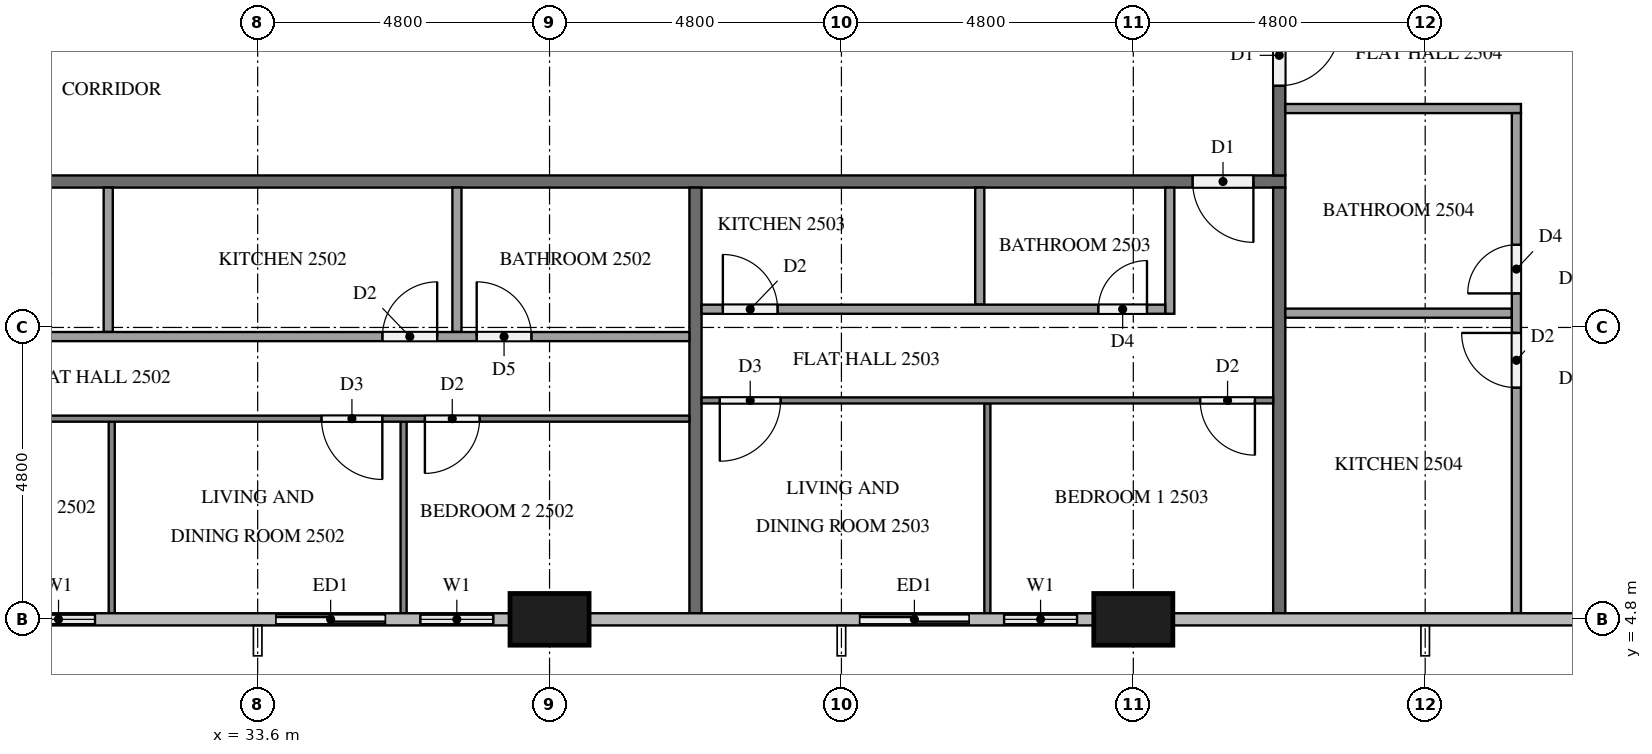
"""IFC4 building model, lengths in metres.
Left out: names, types, materials, properties, quantities, classifications, styles, units other than length and angle.
Written with IfcOpenShell. Run it as: python <this file> out.ifc"""

import sys

from ifc_helpers import new_model, si_unit, direction, frame, frame_2d, origin, origin_2d, place, context, subcontext, project, spatial, rectangle, extrude, element, fill, save


model = new_model("IFC4")
c1 = context("Model", 3, precision=1e-05, world=origin(), true_north=direction((0.0, 1.0)))
c2 = subcontext(c1, "Body", "Model", "MODEL_VIEW")
j1 = project(units=[si_unit("LENGTHUNIT", "METRE"), si_unit("PLANEANGLEUNIT", "RADIAN")], contexts=[c1])
p1 = place(None, origin())
s1 = spatial("IfcSite", under=j1, at=p1, CompositionType="ELEMENT")
p2 = place(p1, origin())
s2 = spatial("IfcBuilding", under=s1, at=p2, CompositionType="ELEMENT")
p3 = place(p2, frame((0.0, 0.0, 99.7)))
s3 = spatial("IfcBuildingStorey", under=s2, at=p3, CompositionType="ELEMENT", Elevation=99.7)
for number, where, z_axis, x_axis in (
    (1, (38.4, 4.8, 0.0), (0.0, 0.0, 1.0), (1.0, 0.0, 0.0)),
    (2, (48.0, 4.8, 0.0), (0.0, 0.0, 1.0), (1.0, 0.0, 0.0)),
):
    element("IfcColumn", number, at=place(p3, frame(where, z_axis=z_axis, x_axis=x_axis)), inside=s3, PredefinedType="COLUMN", context=c2, shape_type="SweptSolid", body=[
        extrude(rectangle(XDim=1.3, YDim=0.85, at=origin_2d()), origin(), (0.0, 0.0, 1.0), 3.2),
    ])
p4 = place(p3, frame((29.45, 4.8, 0.0), z_axis=(0.0, 0.0, 1.0), x_axis=(1.0, 0.0, 0.0)))
e3 = element("IfcWall", 3, at=p4, inside=s3, PredefinedType="SOLIDWALL", context=c2, shape_type="SweptSolid", body=[
    extrude(rectangle(XDim=1.75, YDim=0.15, at=frame_2d((0.875, 0.0))), origin(), (0.0, 0.0, 1.0), 3.2),
])
p5 = place(p4, frame((0.275, 0.0, 0.9)))
e4 = element("IfcOpeningElement", 4, at=p5, cuts=e3, PredefinedType="OPENING", context=c2, shape_type="SweptSolid", body=[
    extrude(rectangle(XDim=1.2, YDim=1.4, at=frame_2d((0.6, 0.7))), frame((0.0, 0.085, 0.0), z_axis=(0.0, -1.0, 0.0), x_axis=(1.0, 0.0, 0.0)), (0.0, 0.0, 1.0), 0.17),
])
p6 = place(p3, frame((33.6, 4.8, 0.0), z_axis=(0.0, 0.0, 1.0), x_axis=(1.0, 0.0, 0.0)))
e5 = element("IfcWall", 5, at=p6, inside=s3, PredefinedType="SOLIDWALL", context=c2, shape_type="SweptSolid", body=[
    extrude(rectangle(XDim=4.15, YDim=0.15, at=frame_2d((2.075, 0.0))), origin(), (0.0, 0.0, 1.0), 3.2),
])
p7 = place(p6, frame((0.3, 0.0, 0.0)))
e6 = element("IfcOpeningElement", 6, at=p7, cuts=e5, PredefinedType="OPENING", context=c2, shape_type="SweptSolid", body=[
    extrude(rectangle(XDim=1.8, YDim=2.4, at=frame_2d((0.9, 1.2))), frame((0.0, 0.085, 0.0), z_axis=(0.0, -1.0, 0.0), x_axis=(1.0, 0.0, 0.0)), (0.0, 0.0, 1.0), 0.17),
])
p8 = place(p6, frame((2.675, 0.0, 0.9)))
e7 = element("IfcOpeningElement", 7, at=p8, cuts=e5, PredefinedType="OPENING", context=c2, shape_type="SweptSolid", body=[
    extrude(rectangle(XDim=1.2, YDim=1.4, at=frame_2d((0.6, 0.7))), frame((0.0, 0.085, 0.0), z_axis=(0.0, -1.0, 0.0), x_axis=(1.0, 0.0, 0.0)), (0.0, 0.0, 1.0), 0.17),
])
p9 = place(p3, frame((43.2, 4.8, 0.0), z_axis=(0.0, 0.0, 1.0), x_axis=(1.0, 0.0, 0.0)))
e8 = element("IfcWall", 8, at=p9, inside=s3, PredefinedType="SOLIDWALL", context=c2, shape_type="SweptSolid", body=[
    extrude(rectangle(XDim=4.15, YDim=0.15, at=frame_2d((2.075, 0.0))), origin(), (0.0, 0.0, 1.0), 3.2),
])
p10 = place(p9, frame((0.3, 0.0, 0.0)))
e9 = element("IfcOpeningElement", 9, at=p10, cuts=e8, PredefinedType="OPENING", context=c2, shape_type="SweptSolid", body=[
    extrude(rectangle(XDim=1.8, YDim=2.4, at=frame_2d((0.9, 1.2))), frame((0.0, 0.085, 0.0), z_axis=(0.0, -1.0, 0.0), x_axis=(1.0, 0.0, 0.0)), (0.0, 0.0, 1.0), 0.17),
])
p11 = place(p9, frame((2.675, 0.0, 0.9)))
e10 = element("IfcOpeningElement", 10, at=p11, cuts=e8, PredefinedType="OPENING", context=c2, shape_type="SweptSolid", body=[
    extrude(rectangle(XDim=1.2, YDim=1.4, at=frame_2d((0.6, 0.7))), frame((0.0, 0.085, 0.0), z_axis=(0.0, -1.0, 0.0), x_axis=(1.0, 0.0, 0.0)), (0.0, 0.0, 1.0), 0.17),
])
p12 = place(p3, frame((50.5, 12.0, 0.0), z_axis=(0.0, 0.0, 1.0), x_axis=(-1.0, 0.0, 0.0)))
e11 = element("IfcWall", 11, at=p12, inside=s3, PredefinedType="PARTITIONING", context=c2, shape_type="SweptSolid", body=[
    extrude(rectangle(XDim=38.6, YDim=0.2, at=frame_2d((19.3, 0.0))), origin(), (0.0, 0.0, 1.0), 3.2),
])
p13 = place(p12, frame((37.075, 0.0, 0.0)))
e12 = element("IfcOpeningElement", 12, at=p13, cuts=e11, PredefinedType="OPENING", context=c2, shape_type="SweptSolid", body=[
    extrude(rectangle(XDim=1.0, YDim=2.1, at=frame_2d((0.5, 1.05))), frame((0.0, 0.11, 0.0), z_axis=(0.0, -1.0, 0.0), x_axis=(1.0, 0.0, 0.0)), (0.0, 0.0, 1.0), 0.22),
])
p14 = place(p12, frame((22.675, 0.0, 0.0)))
e13 = element("IfcOpeningElement", 13, at=p14, cuts=e11, PredefinedType="OPENING", context=c2, shape_type="SweptSolid", body=[
    extrude(rectangle(XDim=1.0, YDim=2.1, at=frame_2d((0.5, 1.05))), frame((0.0, 0.11, 0.0), z_axis=(0.0, -1.0, 0.0), x_axis=(1.0, 0.0, 0.0)), (0.0, 0.0, 1.0), 0.22),
])
p15 = place(p12, frame((0.525, 0.0, 0.0)))
e14 = element("IfcOpeningElement", 14, at=p15, cuts=e11, PredefinedType="OPENING", context=c2, shape_type="SweptSolid", body=[
    extrude(rectangle(XDim=1.0, YDim=2.1, at=frame_2d((0.5, 1.05))), frame((0.0, 0.11, 0.0), z_axis=(0.0, -1.0, 0.0), x_axis=(1.0, 0.0, 0.0)), (0.0, 0.0, 1.0), 0.22),
])
p16 = place(p3, frame((50.4, 14.9, 0.0), z_axis=(0.0, 0.0, 1.0), x_axis=(0.0, -1.0, 0.0)))
e15 = element("IfcWall", 15, at=p16, inside=s3, PredefinedType="PARTITIONING", context=c2, shape_type="SweptSolid", body=[
    extrude(rectangle(XDim=2.8, YDim=0.2, at=frame_2d((1.4, 0.0))), origin(), (0.0, 0.0, 1.0), 3.2),
])
p17 = place(p16, frame((0.325, 0.0, 0.0)))
e16 = element("IfcOpeningElement", 16, at=p17, cuts=e15, PredefinedType="OPENING", context=c2, shape_type="SweptSolid", body=[
    extrude(rectangle(XDim=1.0, YDim=2.1, at=frame_2d((0.5, 1.05))), frame((0.0, 0.11, 0.0), z_axis=(0.0, -1.0, 0.0), x_axis=(1.0, 0.0, 0.0)), (0.0, 0.0, 1.0), 0.22),
])
for number, where, z_axis, x_axis in (
    (17, (40.8, 11.9, 0.0), (0.0, 0.0, 1.0), (0.0, -1.0, 0.0)),
    (18, (50.4, 11.9, 0.0), (0.0, 0.0, 1.0), (0.0, -1.0, 0.0)),
):
    element("IfcWall", number, at=place(p3, frame(where, z_axis=z_axis, x_axis=x_axis)), inside=s3, PredefinedType="PARTITIONING", context=c2, shape_type="SweptSolid", body=[
        extrude(rectangle(XDim=7.0, YDim=0.2, at=frame_2d((3.5, 0.0))), origin(), (0.0, 0.0, 1.0), 3.2),
    ])
for number, where, z_axis, x_axis in (
    (19, (31.2, 8.05, 0.0), (0.0, 0.0, 1.0), (0.0, -1.0, 0.0)),
    (20, (36.0, 8.05, 0.0), (0.0, 0.0, 1.0), (0.0, -1.0, 0.0)),
):
    element("IfcWall", number, at=place(p3, frame(where, z_axis=z_axis, x_axis=x_axis)), inside=s3, PredefinedType="PARTITIONING", context=c2, shape_type="SweptSolid", body=[
        extrude(rectangle(XDim=3.15, YDim=0.1, at=frame_2d((1.575, 0.0))), origin(), (0.0, 0.0, 1.0), 3.2),
    ])
p18 = place(p3, frame((40.7, 8.1, 0.0), z_axis=(0.0, 0.0, 1.0), x_axis=(-1.0, 0.0, 0.0)))
e21 = element("IfcWall", 21, at=p18, inside=s3, PredefinedType="PARTITIONING", context=c2, shape_type="SweptSolid", body=[
    extrude(rectangle(XDim=14.2, YDim=0.1, at=frame_2d((7.1, 0.0))), origin(), (0.0, 0.0, 1.0), 3.2),
])
p19 = place(p18, frame((13.0, 0.0, 0.0)))
e22 = element("IfcOpeningElement", 22, at=p19, cuts=e21, PredefinedType="OPENING", context=c2, shape_type="SweptSolid", body=[
    extrude(rectangle(XDim=0.9, YDim=2.1, at=frame_2d((0.45, 1.05))), frame((0.0, 0.06, 0.0), z_axis=(0.0, -1.0, 0.0), x_axis=(1.0, 0.0, 0.0)), (0.0, 0.0, 1.0), 0.12),
])
p20 = place(p18, frame((5.05, 0.0, 0.0)))
e23 = element("IfcOpeningElement", 23, at=p20, cuts=e21, PredefinedType="OPENING", context=c2, shape_type="SweptSolid", body=[
    extrude(rectangle(XDim=1.0, YDim=2.1, at=frame_2d((0.5, 1.05))), frame((0.0, 0.06, 0.0), z_axis=(0.0, -1.0, 0.0), x_axis=(1.0, 0.0, 0.0)), (0.0, 0.0, 1.0), 0.12),
])
p21 = place(p18, frame((3.45, 0.0, 0.0)))
e24 = element("IfcOpeningElement", 24, at=p21, cuts=e21, PredefinedType="OPENING", context=c2, shape_type="SweptSolid", body=[
    extrude(rectangle(XDim=0.9, YDim=2.1, at=frame_2d((0.45, 1.05))), frame((0.0, 0.06, 0.0), z_axis=(0.0, -1.0, 0.0), x_axis=(1.0, 0.0, 0.0)), (0.0, 0.0, 1.0), 0.12),
])
for number, where, z_axis, x_axis in (
    (25, (31.142, 11.9, 0.0), (0.0, 0.0, 1.0), (0.0, -1.0, 0.0)),
    (26, (36.877, 11.9, 0.0), (0.0, 0.0, 1.0), (0.0, -1.0, 0.0)),
):
    element("IfcWall", number, at=place(p3, frame(where, z_axis=z_axis, x_axis=x_axis)), inside=s3, PredefinedType="PARTITIONING", context=c2, shape_type="SweptSolid", body=[
        extrude(rectangle(XDim=2.375, YDim=0.15, at=frame_2d((1.188, 0.0))), origin(), (0.0, 0.0, 1.0), 3.2),
    ])
p22 = place(p3, frame((28.275, 9.45, 0.0), z_axis=(0.0, 0.0, 1.0), x_axis=(1.0, 0.0, 0.0)))
e27 = element("IfcWall", 27, at=p22, inside=s3, PredefinedType="PARTITIONING", context=c2, shape_type="SweptSolid", body=[
    extrude(rectangle(XDim=12.425, YDim=0.15, at=frame_2d((6.212, 0.0))), origin(), (0.0, 0.0, 1.0), 3.2),
])
p23 = place(p22, frame((0.3, 0.0, 0.0)))
e28 = element("IfcOpeningElement", 28, at=p23, cuts=e27, PredefinedType="OPENING", context=c2, shape_type="SweptSolid", body=[
    extrude(rectangle(XDim=0.8, YDim=2.1, at=frame_2d((0.4, 1.05))), frame((0.0, 0.085, 0.0), z_axis=(0.0, -1.0, 0.0), x_axis=(1.0, 0.0, 0.0)), (0.0, 0.0, 1.0), 0.17),
])
p24 = place(p22, frame((7.377, 0.0, 0.0)))
e29 = element("IfcOpeningElement", 29, at=p24, cuts=e27, PredefinedType="OPENING", context=c2, shape_type="SweptSolid", body=[
    extrude(rectangle(XDim=0.9, YDim=2.1, at=frame_2d((0.45, 1.05))), frame((0.0, 0.085, 0.0), z_axis=(0.0, -1.0, 0.0), x_axis=(1.0, 0.0, 0.0)), (0.0, 0.0, 1.0), 0.17),
])
p25 = place(p22, frame((8.927, 0.0, 0.0)))
e30 = element("IfcOpeningElement", 30, at=p25, cuts=e27, PredefinedType="OPENING", context=c2, shape_type="SweptSolid", body=[
    extrude(rectangle(XDim=0.9, YDim=2.1, at=frame_2d((0.45, 1.05))), frame((0.0, 0.085, 0.0), z_axis=(0.0, -1.0, 0.0), x_axis=(1.0, 0.0, 0.0)), (0.0, 0.0, 1.0), 0.17),
])
p26 = place(p3, frame((45.6, 8.35, 0.0), z_axis=(0.0, 0.0, 1.0), x_axis=(0.0, -1.0, 0.0)))
e31 = element("IfcWall", 31, at=p26, inside=s3, PredefinedType="PARTITIONING", context=c2, shape_type="SweptSolid", body=[
    extrude(rectangle(XDim=3.45, YDim=0.1, at=frame_2d((1.725, 0.0))), origin(), (0.0, 0.0, 1.0), 3.2),
])
p27 = place(p3, frame((50.3, 8.4, 0.0), z_axis=(0.0, 0.0, 1.0), x_axis=(-1.0, 0.0, 0.0)))
e32 = element("IfcWall", 32, at=p27, inside=s3, PredefinedType="PARTITIONING", context=c2, shape_type="SweptSolid", body=[
    extrude(rectangle(XDim=9.4, YDim=0.1, at=frame_2d((4.7, 0.0))), origin(), (0.0, 0.0, 1.0), 3.2),
])
p28 = place(p27, frame((0.3, 0.0, 0.0)))
e33 = element("IfcOpeningElement", 33, at=p28, cuts=e32, PredefinedType="OPENING", context=c2, shape_type="SweptSolid", body=[
    extrude(rectangle(XDim=0.9, YDim=2.1, at=frame_2d((0.45, 1.05))), frame((0.0, 0.06, 0.0), z_axis=(0.0, -1.0, 0.0), x_axis=(1.0, 0.0, 0.0)), (0.0, 0.0, 1.0), 0.12),
])
p29 = place(p27, frame((8.1, 0.0, 0.0)))
e34 = element("IfcOpeningElement", 34, at=p29, cuts=e32, PredefinedType="OPENING", context=c2, shape_type="SweptSolid", body=[
    extrude(rectangle(XDim=1.0, YDim=2.1, at=frame_2d((0.5, 1.05))), frame((0.0, 0.06, 0.0), z_axis=(0.0, -1.0, 0.0), x_axis=(1.0, 0.0, 0.0)), (0.0, 0.0, 1.0), 0.12),
])
p30 = place(p3, frame((45.475, 11.9, 0.0), z_axis=(0.0, 0.0, 1.0), x_axis=(0.0, -1.0, 0.0)))
e35 = element("IfcWall", 35, at=p30, inside=s3, PredefinedType="PARTITIONING", context=c2, shape_type="SweptSolid", body=[
    extrude(rectangle(XDim=1.925, YDim=0.15, at=frame_2d((0.962, 0.0))), origin(), (0.0, 0.0, 1.0), 3.2),
])
p31 = place(p3, frame((48.6, 11.9, 0.0), z_axis=(0.0, 0.0, 1.0), x_axis=(0.0, -1.0, 0.0)))
e36 = element("IfcWall", 36, at=p31, inside=s3, PredefinedType="PARTITIONING", context=c2, shape_type="SweptSolid", body=[
    extrude(rectangle(XDim=2.075, YDim=0.15, at=frame_2d((1.038, 0.0))), origin(), (0.0, 0.0, 1.0), 3.2),
])
p32 = place(p3, frame((40.9, 9.9, 0.0), z_axis=(0.0, 0.0, 1.0), x_axis=(1.0, 0.0, 0.0)))
e37 = element("IfcWall", 37, at=p32, inside=s3, PredefinedType="PARTITIONING", context=c2, shape_type="SweptSolid", body=[
    extrude(rectangle(XDim=7.625, YDim=0.15, at=frame_2d((3.812, 0.0))), origin(), (0.0, 0.0, 1.0), 3.2),
])
p33 = place(p32, frame((6.525, 0.0, 0.0)))
e38 = element("IfcOpeningElement", 38, at=p33, cuts=e37, PredefinedType="OPENING", context=c2, shape_type="SweptSolid", body=[
    extrude(rectangle(XDim=0.8, YDim=2.1, at=frame_2d((0.4, 1.05))), frame((0.0, 0.085, 0.0), z_axis=(0.0, -1.0, 0.0), x_axis=(1.0, 0.0, 0.0)), (0.0, 0.0, 1.0), 0.17),
])
p34 = place(p32, frame((0.35, 0.0, 0.0)))
e39 = element("IfcOpeningElement", 39, at=p34, cuts=e37, PredefinedType="OPENING", context=c2, shape_type="SweptSolid", body=[
    extrude(rectangle(XDim=0.9, YDim=2.1, at=frame_2d((0.45, 1.05))), frame((0.0, 0.085, 0.0), z_axis=(0.0, -1.0, 0.0), x_axis=(1.0, 0.0, 0.0)), (0.0, 0.0, 1.0), 0.17),
])
p35 = place(p3, frame((50.5, 9.835, 0.0), z_axis=(0.0, 0.0, 1.0), x_axis=(1.0, 0.0, 0.0)))
e40 = element("IfcWall", 40, at=p35, inside=s3, PredefinedType="PARTITIONING", context=c2, shape_type="SweptSolid", body=[
    extrude(rectangle(XDim=3.725, YDim=0.15, at=frame_2d((1.863, 0.0))), origin(), (0.0, 0.0, 1.0), 3.2),
])
p36 = place(p3, frame((50.5, 13.2, 0.0), z_axis=(0.0, 0.0, 1.0), x_axis=(1.0, 0.0, 0.0)))
e41 = element("IfcWall", 41, at=p36, inside=s3, PredefinedType="PARTITIONING", context=c2, shape_type="SweptSolid", body=[
    extrude(rectangle(XDim=3.875, YDim=0.15, at=frame_2d((1.938, 0.0))), origin(), (0.0, 0.0, 1.0), 3.2),
])
p37 = place(p3, frame((54.3, 4.9, 0.0), z_axis=(0.0, 0.0, 1.0), x_axis=(0.0, 1.0, 0.0)))
e42 = element("IfcWall", 42, at=p37, inside=s3, PredefinedType="PARTITIONING", context=c2, shape_type="SweptSolid", body=[
    extrude(rectangle(XDim=8.225, YDim=0.15, at=frame_2d((4.113, 0.0))), origin(), (0.0, 0.0, 1.0), 3.2),
])
p38 = place(p37, frame((5.26, 0.0, 0.0)))
e43 = element("IfcOpeningElement", 43, at=p38, cuts=e42, PredefinedType="OPENING", context=c2, shape_type="SweptSolid", body=[
    extrude(rectangle(XDim=0.8, YDim=2.1, at=frame_2d((0.4, 1.05))), frame((0.0, 0.085, 0.0), z_axis=(0.0, -1.0, 0.0), x_axis=(1.0, 0.0, 0.0)), (0.0, 0.0, 1.0), 0.17),
])
p39 = place(p37, frame((3.71, 0.0, 0.0)))
e44 = element("IfcOpeningElement", 44, at=p39, cuts=e42, PredefinedType="OPENING", context=c2, shape_type="SweptSolid", body=[
    extrude(rectangle(XDim=0.9, YDim=2.1, at=frame_2d((0.45, 1.05))), frame((0.0, 0.085, 0.0), z_axis=(0.0, -1.0, 0.0), x_axis=(1.0, 0.0, 0.0)), (0.0, 0.0, 1.0), 0.17),
])
p40 = place(p5, origin())
e45 = element("IfcWindow", 45, at=p40, inside=s3, PartitioningType="SINGLE_PANEL", PredefinedType="WINDOW", context=c2, shape_type="SweptSolid", body=[
    extrude(rectangle(XDim=1.2, YDim=1.4, at=frame_2d((0.6, 0.7))), frame((0.0, 0.03, 0.0), z_axis=(0.0, -1.0, 0.0), x_axis=(1.0, 0.0, 0.0)), (0.0, 0.0, 1.0), 0.06),
])
fill(e4, e45)
p41 = place(p7, origin())
e46 = element("IfcDoor", 46, at=p41, inside=s3, OperationType="SLIDING_TO_RIGHT", PredefinedType="DOOR", context=c2, shape_type="SweptSolid", body=[
    extrude(rectangle(XDim=1.8, YDim=2.4, at=frame_2d((0.9, 1.2))), frame((0.0, 0.025, 0.0), z_axis=(0.0, -1.0, 0.0), x_axis=(1.0, 0.0, 0.0)), (0.0, 0.0, 1.0), 0.05),
])
fill(e6, e46)
p42 = place(p8, origin())
e47 = element("IfcWindow", 47, at=p42, inside=s3, PartitioningType="SINGLE_PANEL", PredefinedType="WINDOW", context=c2, shape_type="SweptSolid", body=[
    extrude(rectangle(XDim=1.2, YDim=1.4, at=frame_2d((0.6, 0.7))), frame((0.0, 0.03, 0.0), z_axis=(0.0, -1.0, 0.0), x_axis=(1.0, 0.0, 0.0)), (0.0, 0.0, 1.0), 0.06),
])
fill(e7, e47)
p43 = place(p10, origin())
e48 = element("IfcDoor", 48, at=p43, inside=s3, OperationType="SLIDING_TO_LEFT", PredefinedType="DOOR", context=c2, shape_type="SweptSolid", body=[
    extrude(rectangle(XDim=1.8, YDim=2.4, at=frame_2d((0.9, 1.2))), frame((0.0, 0.025, 0.0), z_axis=(0.0, -1.0, 0.0), x_axis=(1.0, 0.0, 0.0)), (0.0, 0.0, 1.0), 0.05),
])
fill(e9, e48)
p44 = place(p11, origin())
e49 = element("IfcWindow", 49, at=p44, inside=s3, PartitioningType="SINGLE_PANEL", PredefinedType="WINDOW", context=c2, shape_type="SweptSolid", body=[
    extrude(rectangle(XDim=1.2, YDim=1.4, at=frame_2d((0.6, 0.7))), frame((0.0, 0.03, 0.0), z_axis=(0.0, -1.0, 0.0), x_axis=(1.0, 0.0, 0.0)), (0.0, 0.0, 1.0), 0.06),
])
fill(e10, e49)
p45 = place(p15, origin())
e50 = element("IfcDoor", 50, at=p45, inside=s3, OperationType="SINGLE_SWING_LEFT", PredefinedType="DOOR", context=c2, shape_type="SweptSolid", body=[
    extrude(rectangle(XDim=1.0, YDim=2.1, at=frame_2d((0.5, 1.05))), frame((0.0, 0.025, 0.0), z_axis=(0.0, -1.0, 0.0), x_axis=(1.0, 0.0, 0.0)), (0.0, 0.0, 1.0), 0.05),
])
fill(e14, e50)
p46 = place(p17, origin())
e51 = element("IfcDoor", 51, at=p46, inside=s3, OperationType="SINGLE_SWING_LEFT", PredefinedType="DOOR", context=c2, shape_type="SweptSolid", body=[
    extrude(rectangle(XDim=1.0, YDim=2.1, at=frame_2d((0.5, 1.05))), frame((0.0, 0.025, 0.0), z_axis=(0.0, -1.0, 0.0), x_axis=(1.0, 0.0, 0.0)), (0.0, 0.0, 1.0), 0.05),
])
fill(e16, e51)
p47 = place(p20, origin())
e52 = element("IfcDoor", 52, at=p47, inside=s3, OperationType="SINGLE_SWING_LEFT", PredefinedType="DOOR", context=c2, shape_type="SweptSolid", body=[
    extrude(rectangle(XDim=1.0, YDim=2.1, at=frame_2d((0.5, 1.05))), frame((0.0, 0.025, 0.0), z_axis=(0.0, -1.0, 0.0), x_axis=(1.0, 0.0, 0.0)), (0.0, 0.0, 1.0), 0.05),
])
fill(e23, e52)
p48 = place(p21, origin())
e53 = element("IfcDoor", 53, at=p48, inside=s3, OperationType="SINGLE_SWING_RIGHT", PredefinedType="DOOR", context=c2, shape_type="SweptSolid", body=[
    extrude(rectangle(XDim=0.9, YDim=2.1, at=frame_2d((0.45, 1.05))), frame((0.0, 0.025, 0.0), z_axis=(0.0, -1.0, 0.0), x_axis=(1.0, 0.0, 0.0)), (0.0, 0.0, 1.0), 0.05),
])
fill(e24, e53)
p49 = place(p24, origin())
e54 = element("IfcDoor", 54, at=p49, inside=s3, OperationType="SINGLE_SWING_RIGHT", PredefinedType="DOOR", context=c2, shape_type="SweptSolid", body=[
    extrude(rectangle(XDim=0.9, YDim=2.1, at=frame_2d((0.45, 1.05))), frame((0.0, 0.025, 0.0), z_axis=(0.0, -1.0, 0.0), x_axis=(1.0, 0.0, 0.0)), (0.0, 0.0, 1.0), 0.05),
])
fill(e29, e54)
p50 = place(p25, origin())
e55 = element("IfcDoor", 55, at=p50, inside=s3, OperationType="SINGLE_SWING_LEFT", PredefinedType="DOOR", context=c2, shape_type="SweptSolid", body=[
    extrude(rectangle(XDim=0.9, YDim=2.1, at=frame_2d((0.45, 1.05))), frame((0.0, 0.025, 0.0), z_axis=(0.0, -1.0, 0.0), x_axis=(1.0, 0.0, 0.0)), (0.0, 0.0, 1.0), 0.05),
])
fill(e30, e55)
p51 = place(p28, origin())
e56 = element("IfcDoor", 56, at=p51, inside=s3, OperationType="SINGLE_SWING_LEFT", PredefinedType="DOOR", context=c2, shape_type="SweptSolid", body=[
    extrude(rectangle(XDim=0.9, YDim=2.1, at=frame_2d((0.45, 1.05))), frame((0.0, 0.025, 0.0), z_axis=(0.0, -1.0, 0.0), x_axis=(1.0, 0.0, 0.0)), (0.0, 0.0, 1.0), 0.05),
])
fill(e33, e56)
p52 = place(p29, origin())
e57 = element("IfcDoor", 57, at=p52, inside=s3, OperationType="SINGLE_SWING_RIGHT", PredefinedType="DOOR", context=c2, shape_type="SweptSolid", body=[
    extrude(rectangle(XDim=1.0, YDim=2.1, at=frame_2d((0.5, 1.05))), frame((0.0, 0.025, 0.0), z_axis=(0.0, -1.0, 0.0), x_axis=(1.0, 0.0, 0.0)), (0.0, 0.0, 1.0), 0.05),
])
fill(e34, e57)
p53 = place(p33, origin())
e58 = element("IfcDoor", 58, at=p53, inside=s3, OperationType="SINGLE_SWING_RIGHT", PredefinedType="DOOR", context=c2, shape_type="SweptSolid", body=[
    extrude(rectangle(XDim=0.8, YDim=2.1, at=frame_2d((0.4, 1.05))), frame((0.0, 0.025, 0.0), z_axis=(0.0, -1.0, 0.0), x_axis=(1.0, 0.0, 0.0)), (0.0, 0.0, 1.0), 0.05),
])
fill(e38, e58)
p54 = place(p34, origin())
e59 = element("IfcDoor", 59, at=p54, inside=s3, OperationType="SINGLE_SWING_LEFT", PredefinedType="DOOR", context=c2, shape_type="SweptSolid", body=[
    extrude(rectangle(XDim=0.9, YDim=2.1, at=frame_2d((0.45, 1.05))), frame((0.0, 0.025, 0.0), z_axis=(0.0, -1.0, 0.0), x_axis=(1.0, 0.0, 0.0)), (0.0, 0.0, 1.0), 0.05),
])
fill(e39, e59)
p55 = place(p38, origin())
e60 = element("IfcDoor", 60, at=p55, inside=s3, OperationType="SINGLE_SWING_LEFT", PredefinedType="DOOR", context=c2, shape_type="SweptSolid", body=[
    extrude(rectangle(XDim=0.8, YDim=2.1, at=frame_2d((0.4, 1.05))), frame((0.0, 0.025, 0.0), z_axis=(0.0, -1.0, 0.0), x_axis=(1.0, 0.0, 0.0)), (0.0, 0.0, 1.0), 0.05),
])
fill(e43, e60)
p56 = place(p39, origin())
e61 = element("IfcDoor", 61, at=p56, inside=s3, OperationType="SINGLE_SWING_RIGHT", PredefinedType="DOOR", context=c2, shape_type="SweptSolid", body=[
    extrude(rectangle(XDim=0.9, YDim=2.1, at=frame_2d((0.45, 1.05))), frame((0.0, 0.025, 0.0), z_axis=(0.0, -1.0, 0.0), x_axis=(1.0, 0.0, 0.0)), (0.0, 0.0, 1.0), 0.05),
])
fill(e44, e61)
save(model, sys.argv[1])
